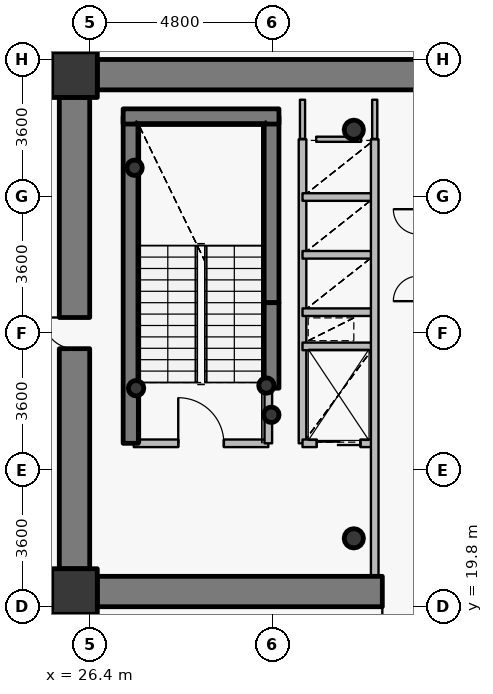
"""IFC4 building model, lengths in metres.
Left out: names, types, materials, properties, quantities, classifications, styles, units other than length and angle.
Written with IfcOpenShell. Run it as: python <this file> out.ifc"""

import sys

from ifc_helpers import new_model, si_unit, direction, frame, frame_2d, origin, origin_2d, place, context, subcontext, project, spatial, rectangle, hollow_circle, extrude, source, transform, mapped, element, fill, save


model = new_model("IFC4")
c1 = context("Model", 3, precision=1e-05, world=origin(), true_north=direction((0.0, 1.0)))
c2 = subcontext(c1, "Body", "Model", "MODEL_VIEW")
j1 = project(units=[si_unit("LENGTHUNIT", "METRE"), si_unit("PLANEANGLEUNIT", "RADIAN")], contexts=[c1])
p1 = place(None, origin())
s1 = spatial("IfcSite", under=j1, at=p1, CompositionType="ELEMENT")
p2 = place(p1, origin())
s2 = spatial("IfcBuilding", under=s1, at=p2, CompositionType="ELEMENT")
p3 = place(p2, frame((0.0, 0.0, 123.45)))
s3 = spatial("IfcBuildingStorey", under=s2, at=p3, CompositionType="ELEMENT", Elevation=123.45)
for number, where, z_axis, x_axis in (
    (1, (26.0, 20.2, 0.0), (0.0, 0.0, 1.0), (1.0, 0.0, 0.0)),
    (2, (26.0, 33.8, 0.0), (0.0, 0.0, 1.0), (1.0, 0.0, 0.0)),
):
    element("IfcColumn", number, at=place(p3, frame(where, z_axis=z_axis, x_axis=x_axis)), inside=s3, PredefinedType="COLUMN", context=c2, shape_type="SweptSolid", body=[
        extrude(rectangle(XDim=1.2, YDim=1.2, at=origin_2d()), origin(), (0.0, 0.0, 1.0), 3.75),
    ])
for number, where, z_axis, x_axis in (
    (3, (33.35, 21.6, 0.0), (0.0, 0.0, 1.0), (1.0, 0.0, 0.0)),
    (4, (33.35, 32.35, 0.0), (0.0, 0.0, 1.0), (1.0, 0.0, 0.0)),
):
    element("IfcColumn", number, at=place(p3, frame(where, z_axis=z_axis, x_axis=x_axis)), inside=s3, PredefinedType="COLUMN", context=c2, shape_type="SweptSolid", body=[
        extrude(hollow_circle(Radius=0.254, WallThickness=0.02, at=origin_2d()), origin(), (0.0, 0.0, 1.0), 3.75),
    ])
p4 = place(p3, frame((27.48, 24.1, 0.0), z_axis=(0.0, 0.0, 1.0), x_axis=(0.0, 1.0, 0.0)))
e5 = element("IfcWall", 5, at=p4, inside=s3, PredefinedType="SHEAR", context=c2, shape_type="SweptSolid", body=[
    extrude(rectangle(XDim=8.6, YDim=0.4, at=frame_2d((4.3, 0.0))), origin(), (0.0, 0.0, 1.0), 3.75),
])
p5 = place(p3, frame((31.18, 27.8, 0.0), z_axis=(0.0, 0.0, 1.0), x_axis=(0.0, 1.0, 0.0)))
e6 = element("IfcWall", 6, at=p5, inside=s3, PredefinedType="SHEAR", context=c2, shape_type="SweptSolid", body=[
    extrude(rectangle(XDim=4.9, YDim=0.4, at=frame_2d((2.45, 0.0))), origin(), (0.0, 0.0, 1.0), 3.75),
])
p6 = place(p3, frame((27.28, 32.7, 0.0), z_axis=(0.0, 0.0, 1.0), x_axis=(1.0, 0.0, 0.0)))
e7 = element("IfcWall", 7, at=p6, inside=s3, PredefinedType="SHEAR", context=c2, shape_type="SweptSolid", body=[
    extrude(rectangle(XDim=4.1, YDim=0.4, at=frame_2d((2.05, 0.0))), origin(), (0.0, 0.0, 1.0), 3.75),
])
for number, where, z_axis, x_axis in (
    (8, (27.58, 31.35, 0.0), (0.0, 0.0, 1.0), (1.0, 0.0, 0.0)),
    (9, (31.05, 25.62, 0.0), (0.0, 0.0, 1.0), (1.0, 0.0, 0.0)),
    (10, (31.18, 24.85, 0.0), (0.0, 0.0, 1.0), (1.0, 0.0, 0.0)),
    (11, (27.62, 25.55, 0.0), (0.0, 0.0, 1.0), (1.0, 0.0, 0.0)),
):
    element("IfcColumn", number, at=place(p3, frame(where, z_axis=z_axis, x_axis=x_axis)), inside=s3, PredefinedType="COLUMN", context=c2, shape_type="SweptSolid", body=[
        extrude(hollow_circle(Radius=0.203, WallThickness=0.016, at=origin_2d()), origin(), (0.0, 0.0, 1.0), 3.75),
    ])
p7 = place(p3, frame((26.6, 33.8, 0.0), z_axis=(0.0, 0.0, 1.0), x_axis=(1.0, 0.0, 0.0)))
e12 = element("IfcWall", 12, at=p7, inside=s3, PredefinedType="SHEAR", context=c2, shape_type="SweptSolid", body=[
    extrude(rectangle(XDim=18.8, YDim=0.8, at=frame_2d((9.4, 0.0))), origin(), (0.0, 0.0, 1.0), 2.95),
])
p8 = place(p3, frame((45.4, 20.2, 0.0), z_axis=(0.0, 0.0, 1.0), x_axis=(-1.0, 0.0, 0.0)))
e13 = element("IfcWall", 13, at=p8, inside=s3, PredefinedType="SHEAR", context=c2, shape_type="SweptSolid", body=[
    extrude(rectangle(XDim=18.8, YDim=0.8, at=frame_2d((9.4, 0.0))), origin(), (0.0, 0.0, 1.0), 2.95),
])
p9 = place(p8, frame((10.15, 0.0, 0.0)))
e14 = element("IfcOpeningElement", 14, at=p9, cuts=e13, PredefinedType="OPENING", context=c2, shape_type="SweptSolid", body=[
    extrude(rectangle(XDim=1.15, YDim=2.15, at=origin_2d()), frame((0.575, 0.41, 1.075), z_axis=(0.0, -1.0, 0.0), x_axis=(1.0, 0.0, 0.0)), (0.0, 0.0, 1.0), 0.82),
])
p10 = place(p3, frame((26.0, 20.8, 0.0), z_axis=(0.0, 0.0, 1.0), x_axis=(0.0, 1.0, 0.0)))
e15 = element("IfcWall", 15, at=p10, inside=s3, PredefinedType="SHEAR", context=c2, shape_type="SweptSolid", body=[
    extrude(rectangle(XDim=12.4, YDim=0.8, at=frame_2d((6.2, 0.0))), origin(), (0.0, 0.0, 1.0), 2.95),
])
p11 = place(p10, frame((5.79, 0.0, 0.0)))
e16 = element("IfcOpeningElement", 16, at=p11, cuts=e15, PredefinedType="OPENING", context=c2, shape_type="SweptSolid", body=[
    extrude(rectangle(XDim=0.82, YDim=2.1, at=origin_2d()), frame((0.41, 0.41, 1.05), z_axis=(0.0, -1.0, 0.0), x_axis=(1.0, 0.0, 0.0)), (0.0, 0.0, 1.0), 0.82),
])
p12 = place(p3, frame((31.18, 25.55, 0.0), z_axis=(0.0, 0.0, 1.0), x_axis=(0.0, 1.0, 0.0)))
e17 = element("IfcWall", 17, at=p12, inside=s3, PredefinedType="SHEAR", context=c2, shape_type="SweptSolid", body=[
    extrude(rectangle(XDim=2.25, YDim=0.4, at=frame_2d((1.125, 0.0))), origin(), (0.0, 0.0, 1.0), 3.1),
])
p13 = place(p3, frame((27.56, 24.1, 0.0), z_axis=(0.0, 0.0, 1.0), x_axis=(1.0, 0.0, 0.0)))
e18 = element("IfcWall", 18, at=p13, inside=s3, PredefinedType="PARTITIONING", context=c2, shape_type="SweptSolid", body=[
    extrude(rectangle(XDim=3.54, YDim=0.2, at=frame_2d((1.77, 0.0))), origin(), (0.0, 0.0, 1.0), 3.5),
])
p14 = place(p13, frame((1.17, 0.0, 0.0)))
e19 = element("IfcOpeningElement", 19, at=p14, cuts=e18, PredefinedType="OPENING", context=c2, shape_type="SweptSolid", body=[
    extrude(rectangle(XDim=1.2, YDim=2.15, at=origin_2d()), frame((0.6, 0.11, 1.075), z_axis=(0.0, -1.0, 0.0), x_axis=(1.0, 0.0, 0.0)), (0.0, 0.0, 1.0), 0.22),
])
p15 = place(p3, frame((31.1, 24.1, 0.0), z_axis=(0.0, 0.0, 1.0), x_axis=(0.0, 1.0, 0.0)))
e20 = element("IfcWall", 20, at=p15, inside=s3, PredefinedType="PARTITIONING", context=c2, shape_type="SweptSolid", body=[
    extrude(rectangle(XDim=1.44, YDim=0.2, at=frame_2d((0.72, 0.0))), origin(), (0.0, 0.0, 1.0), 3.5),
])
p16 = place(p3, frame((32.0, 24.1, 0.0), z_axis=(0.0, 0.0, 1.0), x_axis=(0.0, 1.0, 0.0)))
e21 = element("IfcWall", 21, at=p16, inside=s3, PredefinedType="PARTITIONING", context=c2, shape_type="SweptSolid", body=[
    extrude(rectangle(XDim=8.0, YDim=0.2, at=frame_2d((4.0, 0.0))), origin(), (0.0, 0.0, 1.0), 3.5),
])
p17 = place(p3, frame((32.0, 24.1, 0.0), z_axis=(0.0, 0.0, 1.0), x_axis=(1.0, 0.0, 0.0)))
e22 = element("IfcWall", 22, at=p17, inside=s3, PredefinedType="PARTITIONING", context=c2, shape_type="SweptSolid", body=[
    extrude(rectangle(XDim=1.9, YDim=0.2, at=frame_2d((0.95, 0.0))), origin(), (0.0, 0.0, 1.0), 3.085),
])
p18 = place(p17, frame((0.375, 0.0, 0.0)))
e23 = element("IfcOpeningElement", 23, at=p18, cuts=e22, PredefinedType="OPENING", context=c2, shape_type="SweptSolid", body=[
    extrude(rectangle(XDim=1.15, YDim=2.15, at=origin_2d()), frame((0.575, 0.11, 1.075), z_axis=(0.0, -1.0, 0.0), x_axis=(1.0, 0.0, 0.0)), (0.0, 0.0, 1.0), 0.22),
])
for number, where, z_axis, x_axis in (
    (24, (32.0, 26.65, 0.0), (0.0, 0.0, 1.0), (1.0, 0.0, 0.0)),
    (25, (32.0, 27.55, 0.0), (0.0, 0.0, 1.0), (1.0, 0.0, 0.0)),
    (26, (32.0, 29.06, 0.0), (0.0, 0.0, 1.0), (1.0, 0.0, 0.0)),
    (27, (32.0, 30.58, 0.0), (0.0, 0.0, 1.0), (1.0, 0.0, 0.0)),
):
    element("IfcWall", number, at=place(p3, frame(where, z_axis=z_axis, x_axis=x_axis)), inside=s3, PredefinedType="PARTITIONING", context=c2, shape_type="SweptSolid", body=[
        extrude(rectangle(XDim=1.9, YDim=0.2, at=frame_2d((0.95, 0.0))), origin(), (0.0, 0.0, 1.0), 3.085),
    ])
p19 = place(p3, frame((33.9, 20.6, 0.0), z_axis=(0.0, 0.0, 1.0), x_axis=(0.0, 1.0, 0.0)))
e28 = element("IfcWall", 28, at=p19, inside=s3, PredefinedType="PARTITIONING", context=c2, shape_type="SweptSolid", body=[
    extrude(rectangle(XDim=11.5, YDim=0.2, at=frame_2d((5.75, 0.0))), origin(), (0.0, 0.0, 1.0), 3.085),
])
p20 = place(p3, frame((32.36, 32.1, 0.0), z_axis=(0.0, 0.0, 1.0), x_axis=(1.0, 0.0, 0.0)))
e29 = element("IfcWall", 29, at=p20, inside=s3, PredefinedType="PARTITIONING", context=c2, shape_type="SweptSolid", body=[
    extrude(rectangle(XDim=1.18, YDim=0.135, at=frame_2d((0.59, 0.0))), origin(), (0.0, 0.0, 1.0), 3.085),
])
p21 = place(p3, frame((32.0, 33.14, 0.0), z_axis=(0.0, 0.0, 1.0), x_axis=(0.0, -1.0, 0.0)))
e30 = element("IfcWall", 30, at=p21, inside=s3, PredefinedType="PARTITIONING", context=c2, shape_type="SweptSolid", body=[
    extrude(rectangle(XDim=1.03, YDim=0.135, at=frame_2d((0.515, 0.0))), origin(), (0.0, 0.0, 1.0), 3.035),
])
p22 = place(p3, frame((33.9, 32.11, 0.0), z_axis=(0.0, 0.0, 1.0), x_axis=(0.0, 1.0, 0.0)))
e31 = element("IfcWall", 31, at=p22, inside=s3, PredefinedType="PARTITIONING", context=c2, shape_type="SweptSolid", body=[
    extrude(rectangle(XDim=1.03, YDim=0.135, at=frame_2d((0.515, 0.0))), origin(), (0.0, 0.0, 1.0), 3.085),
])
p23 = place(p3, frame((26.59, 34.2, 0.0), z_axis=(0.0, 0.0, 1.0), x_axis=(-1.0, 0.0, 0.0)))
e32 = element("IfcWall", 32, at=p23, inside=s3, PredefinedType="PARTITIONING", context=c2, shape_type="SweptSolid", body=[
    extrude(rectangle(XDim=0.99, YDim=0.135, at=frame_2d((0.495, 0.0))), origin(), (0.0, 0.0, 1.0), 2.935),
])
p24 = place(p3, frame((25.6, 33.893, 0.0), z_axis=(0.0, 0.0, 1.0), x_axis=(0.0, -1.0, 0.0)))
e33 = element("IfcWall", 33, at=p24, inside=s3, PredefinedType="PARTITIONING", context=c2, shape_type="SweptSolid", body=[
    extrude(rectangle(XDim=0.683, YDim=0.135, at=frame_2d((0.341, 0.0))), origin(), (0.0, 0.0, 1.0), 3.5),
])
p25 = place(p3, frame((25.6, 20.79, 0.0), z_axis=(0.0, 0.0, 1.0), x_axis=(0.0, -1.0, 0.0)))
e34 = element("IfcWall", 34, at=p25, inside=s3, PredefinedType="PARTITIONING", context=c2, shape_type="SweptSolid", body=[
    extrude(rectangle(XDim=0.99, YDim=0.135, at=frame_2d((0.495, 0.0))), origin(), (0.0, 0.0, 1.0), 3.5),
])
p26 = place(p3, frame((25.907, 19.8, 0.0), z_axis=(0.0, 0.0, 1.0), x_axis=(1.0, 0.0, 0.0)))
e35 = element("IfcWall", 35, at=p26, inside=s3, PredefinedType="PARTITIONING", context=c2, shape_type="SweptSolid", body=[
    extrude(rectangle(XDim=0.683, YDim=0.135, at=frame_2d((0.341, 0.0))), origin(), (0.0, 0.0, 1.0), 2.935),
])
m1 = source(origin(), c2, "Body", "SweptSolid", [
    extrude(rectangle(XDim=0.82, YDim=2.1, at=origin_2d()), frame((0.41, 0.025, 1.05), z_axis=(0.0, -1.0, 0.0), x_axis=(1.0, 0.0, 0.0)), (0.0, 0.0, 1.0), 0.05),
])
p27 = place(p11, origin())
e36 = element("IfcDoor", 36, at=p27, inside=s3, OperationType="SINGLE_SWING_RIGHT", PredefinedType="DOOR", context=c2, shape_type="MappedRepresentation", body=[
    mapped(m1, transform((0.0, 0.0, 0.0), x_axis=(1.0, 0.0, 0.0), y_axis=(0.0, 1.0, 0.0), z_axis=(0.0, 0.0, 1.0), scale=1.0)),
])
fill(e16, e36)
m2 = source(origin(), c2, "Body", "SweptSolid", [
    extrude(rectangle(XDim=1.15, YDim=2.15, at=origin_2d()), frame((0.575, 0.025, 1.075), z_axis=(0.0, -1.0, 0.0), x_axis=(1.0, 0.0, 0.0)), (0.0, 0.0, 1.0), 0.05),
])
p28 = place(p9, origin())
e37 = element("IfcDoor", 37, at=p28, inside=s3, OperationType="SINGLE_SWING_RIGHT", PredefinedType="DOOR", context=c2, shape_type="MappedRepresentation", body=[
    mapped(m2, transform((0.0, 0.0, 0.0), x_axis=(1.0, 0.0, 0.0), y_axis=(0.0, 1.0, 0.0), z_axis=(0.0, 0.0, 1.0), scale=1.0)),
])
fill(e14, e37)
m3 = source(origin(), c2, "Body", "SweptSolid", [
    extrude(rectangle(XDim=1.2, YDim=2.15, at=origin_2d()), frame((0.6, 0.025, 1.075), z_axis=(0.0, -1.0, 0.0), x_axis=(1.0, 0.0, 0.0)), (0.0, 0.0, 1.0), 0.05),
])
p29 = place(p14, origin())
e38 = element("IfcDoor", 38, at=p29, inside=s3, OperationType="SINGLE_SWING_LEFT", PredefinedType="DOOR", context=c2, shape_type="MappedRepresentation", body=[
    mapped(m3, transform((0.0, 0.0, 0.0), x_axis=(1.0, 0.0, 0.0), y_axis=(0.0, 1.0, 0.0), z_axis=(0.0, 0.0, 1.0), scale=1.0)),
])
fill(e19, e38)
m4 = source(origin(), c2, "Body", "SweptSolid", [
    extrude(rectangle(XDim=1.15, YDim=2.15, at=origin_2d()), frame((0.575, 0.025, 1.075), z_axis=(0.0, -1.0, 0.0), x_axis=(1.0, 0.0, 0.0)), (0.0, 0.0, 1.0), 0.05),
])
p30 = place(p18, origin())
e39 = element("IfcDoor", 39, at=p30, inside=s3, OperationType="DOUBLE_DOOR_SLIDING", PredefinedType="USERDEFINED", context=c2, shape_type="MappedRepresentation", body=[
    mapped(m4, transform((0.0, 0.0, 0.0), x_axis=(1.0, 0.0, 0.0), y_axis=(0.0, 1.0, 0.0), z_axis=(0.0, 0.0, 1.0), scale=1.0)),
])
fill(e23, e39)
save(model, sys.argv[1])
